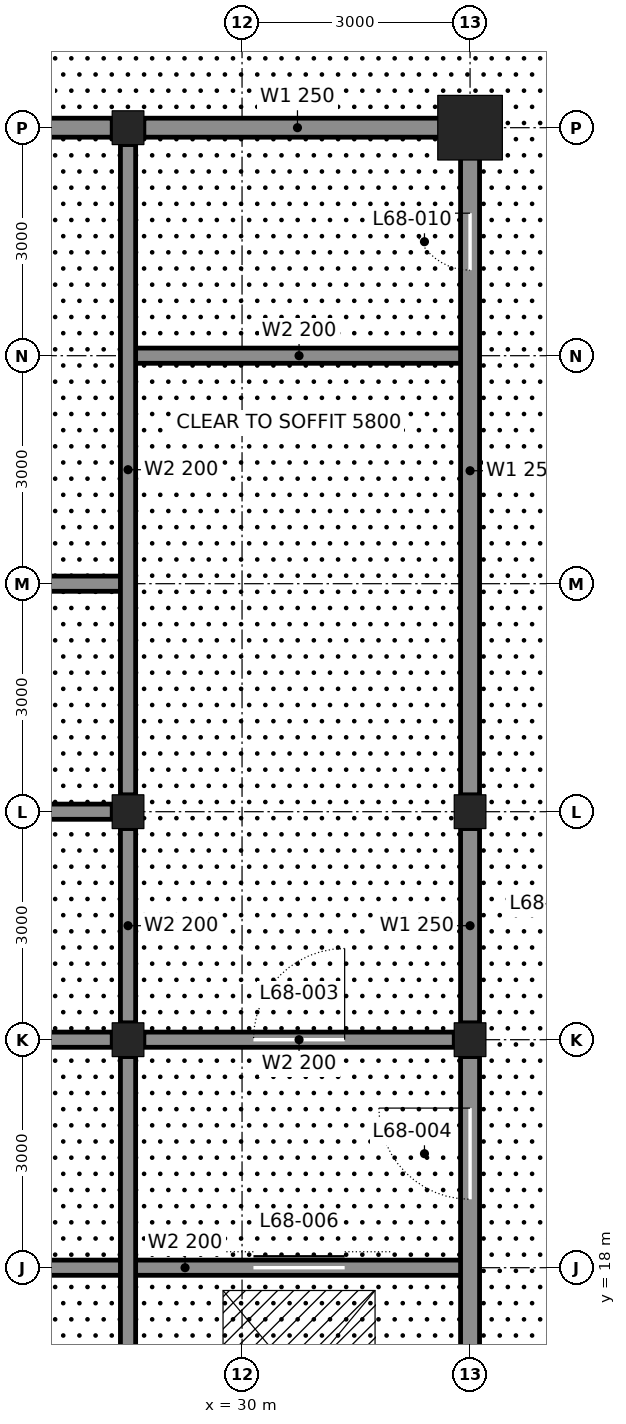
"""IFC4 building model, lengths in metres.
Left out: names, types, materials, properties, quantities, classifications, styles, units other than length and angle.
Written with IfcOpenShell. Run it as: python <this file> out.ifc"""

import sys

from ifc_helpers import new_model, si_unit, direction, frame, frame_2d, origin, origin_2d, place, context, subcontext, project, spatial, rectangle, hollow_rectangle, i_section, extrude, element, fill, save


model = new_model("IFC4")
c1 = context("Model", 3, precision=1e-05, world=origin(), true_north=direction((0.0, 1.0)))
c2 = subcontext(c1, "Body", "Model", "MODEL_VIEW")
j1 = project(units=[si_unit("LENGTHUNIT", "METRE"), si_unit("PLANEANGLEUNIT", "RADIAN")], contexts=[c1])
p1 = place(None, origin())
s1 = spatial("IfcSite", under=j1, at=p1, CompositionType="ELEMENT")
p2 = place(p1, origin())
s2 = spatial("IfcBuilding", under=s1, at=p2, CompositionType="ELEMENT")
p3 = place(p2, frame((0.0, 0.0, 306.0)))
s3 = spatial("IfcBuildingStorey", under=s2, at=p3, CompositionType="ELEMENT", Elevation=306.0)
p4 = place(p3, frame((28.5, 33.0, 0.0), z_axis=(0.0, 0.0, 1.0), x_axis=(1.0, 0.0, 0.0)))
e1 = element("IfcColumn", 1, at=p4, inside=s3, PredefinedType="COLUMN", context=c2, shape_type="SweptSolid", body=[
    extrude(i_section(OverallWidth=0.417, OverallDepth=0.445, WebThickness=0.039, FlangeThickness=0.063, at=origin_2d()), origin(), (0.0, 0.0, 1.0), 6.0),
])
p5 = place(p3, frame((33.0, 33.0, 0.0), z_axis=(0.0, 0.0, 1.0), x_axis=(1.0, 0.0, 0.0)))
e2 = element("IfcColumn", 2, at=p5, inside=s3, PredefinedType="COLUMN", context=c2, shape_type="SweptSolid", body=[
    extrude(hollow_rectangle(XDim=0.85, YDim=0.85, WallThickness=0.085, at=origin_2d()), origin(), (0.0, 0.0, 1.0), 5.8),
])
for number, where, z_axis, x_axis in (
    (3, (33.0, 21.0, 0.0), (0.0, 0.0, 1.0), (1.0, 0.0, 0.0)),
    (4, (33.0, 24.0, 0.0), (0.0, 0.0, 1.0), (1.0, 0.0, 0.0)),
    (5, (28.5, 21.0, 0.0), (0.0, 0.0, 1.0), (1.0, 0.0, 0.0)),
    (6, (28.5, 24.0, 0.0), (0.0, 0.0, 1.0), (1.0, 0.0, 0.0)),
):
    element("IfcColumn", number, at=place(p3, frame(where, z_axis=z_axis, x_axis=x_axis)), inside=s3, PredefinedType="COLUMN", context=c2, shape_type="SweptSolid", body=[
        extrude(i_section(OverallWidth=0.417, OverallDepth=0.445, WebThickness=0.039, FlangeThickness=0.063, at=origin_2d()), origin(), (0.0, 0.0, 1.0), 6.0),
    ])
p6 = place(p3, frame((25.5, 24.0, 0.0), z_axis=(0.0, 0.0, 1.0), x_axis=(1.0, 0.0, 0.0)))
e7 = element("IfcWall", 7, at=p6, inside=s3, PredefinedType="SOLIDWALL", context=c2, shape_type="SweptSolid", body=[
    extrude(rectangle(XDim=2.792, YDim=0.2, at=frame_2d((1.396, 0.0))), origin(), (0.0, 0.0, 1.0), 4.85),
])
p7 = place(p3, frame((25.5, 27.0, 0.0), z_axis=(0.0, 0.0, 1.0), x_axis=(1.0, 0.0, 0.0)))
e8 = element("IfcWall", 8, at=p7, inside=s3, PredefinedType="SOLIDWALL", context=c2, shape_type="SweptSolid", body=[
    extrude(rectangle(XDim=3.0, YDim=0.2, at=frame_2d((1.5, 0.0))), origin(), (0.0, 0.0, 1.0), 5.8),
])
p8 = place(p3, frame((28.5, 30.0, 0.0), z_axis=(0.0, 0.0, 1.0), x_axis=(1.0, 0.0, 0.0)))
e9 = element("IfcWall", 9, at=p8, inside=s3, PredefinedType="SOLIDWALL", context=c2, shape_type="SweptSolid", body=[
    extrude(rectangle(XDim=4.5, YDim=0.2, at=frame_2d((2.25, 0.0))), origin(), (0.0, 0.0, 1.0), 5.8),
])
p9 = place(p3, frame((25.708, 33.0, 0.0), z_axis=(0.0, 0.0, 1.0), x_axis=(1.0, 0.0, 0.0)))
e10 = element("IfcWall", 10, at=p9, inside=s3, PredefinedType="SOLIDWALL", context=c2, shape_type="SweptSolid", body=[
    extrude(rectangle(XDim=2.583, YDim=0.25, at=frame_2d((1.292, 0.0))), origin(), (0.0, 0.0, 1.0), 4.941),
])
p10 = place(p3, frame((28.708, 33.0, 0.0), z_axis=(0.0, 0.0, 1.0), x_axis=(1.0, 0.0, 0.0)))
e11 = element("IfcWall", 11, at=p10, inside=s3, PredefinedType="SOLIDWALL", context=c2, shape_type="SweptSolid", body=[
    extrude(rectangle(XDim=4.042, YDim=0.25, at=frame_2d((2.021, 0.0))), origin(), (0.0, 0.0, 1.0), 4.941),
])
p11 = place(p3, frame((25.5, 18.0, 0.0), z_axis=(0.0, 0.0, 1.0), x_axis=(1.0, 0.0, 0.0)))
e12 = element("IfcWall", 12, at=p11, inside=s3, PredefinedType="SOLIDWALL", context=c2, shape_type="SweptSolid", body=[
    extrude(rectangle(XDim=7.5, YDim=0.2, at=frame_2d((3.75, 0.0))), origin(), (0.0, 0.0, 1.0), 5.8),
])
p12 = place(p11, frame((4.65, 0.0, 0.0)))
e13 = element("IfcOpeningElement", 13, at=p12, cuts=e12, PredefinedType="OPENING", context=c2, shape_type="SweptSolid", body=[
    extrude(rectangle(XDim=1.2, YDim=2.1, at=frame_2d((0.6, 1.05))), frame((0.0, 0.11, 0.0), z_axis=(0.0, -1.0, 0.0), x_axis=(1.0, 0.0, 0.0)), (0.0, 0.0, 1.0), 0.22),
])
p13 = place(p3, frame((25.5, 21.0, 0.0), z_axis=(0.0, 0.0, 1.0), x_axis=(1.0, 0.0, 0.0)))
e14 = element("IfcWall", 14, at=p13, inside=s3, PredefinedType="SOLIDWALL", context=c2, shape_type="SweptSolid", body=[
    extrude(rectangle(XDim=2.792, YDim=0.2, at=frame_2d((1.396, 0.0))), origin(), (0.0, 0.0, 1.0), 4.85),
])
p14 = place(p3, frame((28.708, 21.0, 0.0), z_axis=(0.0, 0.0, 1.0), x_axis=(1.0, 0.0, 0.0)))
e15 = element("IfcWall", 15, at=p14, inside=s3, PredefinedType="SOLIDWALL", context=c2, shape_type="SweptSolid", body=[
    extrude(rectangle(XDim=4.083, YDim=0.2, at=frame_2d((2.042, 0.0))), origin(), (0.0, 0.0, 1.0), 4.85),
])
p15 = place(p14, frame((1.442, 0.0, 0.0)))
e16 = element("IfcOpeningElement", 16, at=p15, cuts=e15, PredefinedType="OPENING", context=c2, shape_type="SweptSolid", body=[
    extrude(rectangle(XDim=1.2, YDim=2.1, at=frame_2d((0.6, 1.05))), frame((0.0, 0.11, 0.0), z_axis=(0.0, -1.0, 0.0), x_axis=(1.0, 0.0, 0.0)), (0.0, 0.0, 1.0), 0.22),
])
p16 = place(p3, frame((28.5, 12.222, 0.0), z_axis=(0.0, 0.0, 1.0), x_axis=(0.0, 1.0, 0.0)))
e17 = element("IfcWall", 17, at=p16, inside=s3, PredefinedType="SOLIDWALL", context=c2, shape_type="SweptSolid", body=[
    extrude(rectangle(XDim=8.555, YDim=0.2, at=frame_2d((4.278, 0.0))), origin(), (0.0, 0.0, 1.0), 4.873),
])
p17 = place(p3, frame((28.5, 21.222, 0.0), z_axis=(0.0, 0.0, 1.0), x_axis=(0.0, 1.0, 0.0)))
e18 = element("IfcWall", 18, at=p17, inside=s3, PredefinedType="SOLIDWALL", context=c2, shape_type="SweptSolid", body=[
    extrude(rectangle(XDim=2.555, YDim=0.2, at=frame_2d((1.278, 0.0))), origin(), (0.0, 0.0, 1.0), 4.873),
])
p18 = place(p3, frame((28.5, 24.222, 0.0), z_axis=(0.0, 0.0, 1.0), x_axis=(0.0, 1.0, 0.0)))
e19 = element("IfcWall", 19, at=p18, inside=s3, PredefinedType="SOLIDWALL", context=c2, shape_type="SweptSolid", body=[
    extrude(rectangle(XDim=8.555, YDim=0.2, at=frame_2d((4.278, 0.0))), origin(), (0.0, 0.0, 1.0), 4.873),
])
p19 = place(p3, frame((33.0, 12.25, 0.0), z_axis=(0.0, 0.0, 1.0), x_axis=(0.0, 1.0, 0.0)))
e20 = element("IfcWall", 20, at=p19, inside=s3, PredefinedType="SOLIDWALL", context=c2, shape_type="SweptSolid", body=[
    extrude(rectangle(XDim=8.528, YDim=0.25, at=frame_2d((4.264, 0.0))), origin(), (0.0, 0.0, 1.0), 4.873),
])
p20 = place(p19, frame((6.65, 0.0, 0.0)))
e21 = element("IfcOpeningElement", 21, at=p20, cuts=e20, PredefinedType="OPENING", context=c2, shape_type="SweptSolid", body=[
    extrude(rectangle(XDim=1.2, YDim=2.1, at=frame_2d((0.6, 1.05))), frame((0.0, 0.135, 0.0), z_axis=(0.0, -1.0, 0.0), x_axis=(1.0, 0.0, 0.0)), (0.0, 0.0, 1.0), 0.27),
])
p21 = place(p19, frame((0.875, 0.0, 0.0)))
e22 = element("IfcOpeningElement", 22, at=p21, cuts=e20, PredefinedType="OPENING", context=c2, shape_type="SweptSolid", body=[
    extrude(rectangle(XDim=0.75, YDim=2.1, at=frame_2d((0.375, 1.05))), frame((0.0, 0.135, 0.0), z_axis=(0.0, -1.0, 0.0), x_axis=(1.0, 0.0, 0.0)), (0.0, 0.0, 1.0), 0.27),
])
p22 = place(p3, frame((33.0, 21.222, 0.0), z_axis=(0.0, 0.0, 1.0), x_axis=(0.0, 1.0, 0.0)))
e23 = element("IfcWall", 23, at=p22, inside=s3, PredefinedType="SOLIDWALL", context=c2, shape_type="SweptSolid", body=[
    extrude(rectangle(XDim=2.555, YDim=0.25, at=frame_2d((1.278, 0.0))), origin(), (0.0, 0.0, 1.0), 4.873),
])
p23 = place(p3, frame((33.0, 24.222, 0.0), z_axis=(0.0, 0.0, 1.0), x_axis=(0.0, 1.0, 0.0)))
e24 = element("IfcWall", 24, at=p23, inside=s3, PredefinedType="SOLIDWALL", context=c2, shape_type="SweptSolid", body=[
    extrude(rectangle(XDim=8.528, YDim=0.25, at=frame_2d((4.264, 0.0))), origin(), (0.0, 0.0, 1.0), 4.873),
])
p24 = place(p23, frame((6.903, 0.0, 0.0)))
e25 = element("IfcOpeningElement", 25, at=p24, cuts=e24, PredefinedType="OPENING", context=c2, shape_type="SweptSolid", body=[
    extrude(rectangle(XDim=0.75, YDim=2.1, at=frame_2d((0.375, 1.05))), frame((0.0, 0.135, 0.0), z_axis=(0.0, -1.0, 0.0), x_axis=(1.0, 0.0, 0.0)), (0.0, 0.0, 1.0), 0.27),
])
p25 = place(p15, origin())
e26 = element("IfcDoor", 26, at=p25, inside=s3, OperationType="SINGLE_SWING_RIGHT", PredefinedType="DOOR", context=c2, shape_type="SweptSolid", body=[
    extrude(rectangle(XDim=1.2, YDim=2.1, at=frame_2d((0.6, 1.05))), frame((0.0, 0.025, 0.0), z_axis=(0.0, -1.0, 0.0), x_axis=(1.0, 0.0, 0.0)), (0.0, 0.0, 1.0), 0.05),
])
fill(e16, e26)
p26 = place(p20, origin())
e27 = element("IfcDoor", 27, at=p26, inside=s3, OperationType="SINGLE_SWING_RIGHT", PredefinedType="DOOR", context=c2, shape_type="SweptSolid", body=[
    extrude(rectangle(XDim=1.2, YDim=2.1, at=frame_2d((0.6, 1.05))), frame((0.0, 0.025, 0.0), z_axis=(0.0, -1.0, 0.0), x_axis=(1.0, 0.0, 0.0)), (0.0, 0.0, 1.0), 0.05),
])
fill(e21, e27)
p27 = place(p12, origin())
e28 = element("IfcDoor", 28, at=p27, inside=s3, OperationType="DOUBLE_DOOR_SLIDING", PredefinedType="DOOR", context=c2, shape_type="SweptSolid", body=[
    extrude(rectangle(XDim=1.2, YDim=2.1, at=frame_2d((0.6, 1.05))), frame((0.0, 0.025, 0.0), z_axis=(0.0, -1.0, 0.0), x_axis=(1.0, 0.0, 0.0)), (0.0, 0.0, 1.0), 0.05),
])
fill(e13, e28)
p28 = place(p24, origin())
e29 = element("IfcDoor", 29, at=p28, inside=s3, OperationType="SINGLE_SWING_RIGHT", PredefinedType="DOOR", context=c2, shape_type="SweptSolid", body=[
    extrude(rectangle(XDim=0.75, YDim=2.1, at=frame_2d((0.375, 1.05))), frame((0.0, 0.025, 0.0), z_axis=(0.0, -1.0, 0.0), x_axis=(1.0, 0.0, 0.0)), (0.0, 0.0, 1.0), 0.05),
])
fill(e25, e29)
save(model, sys.argv[1])
